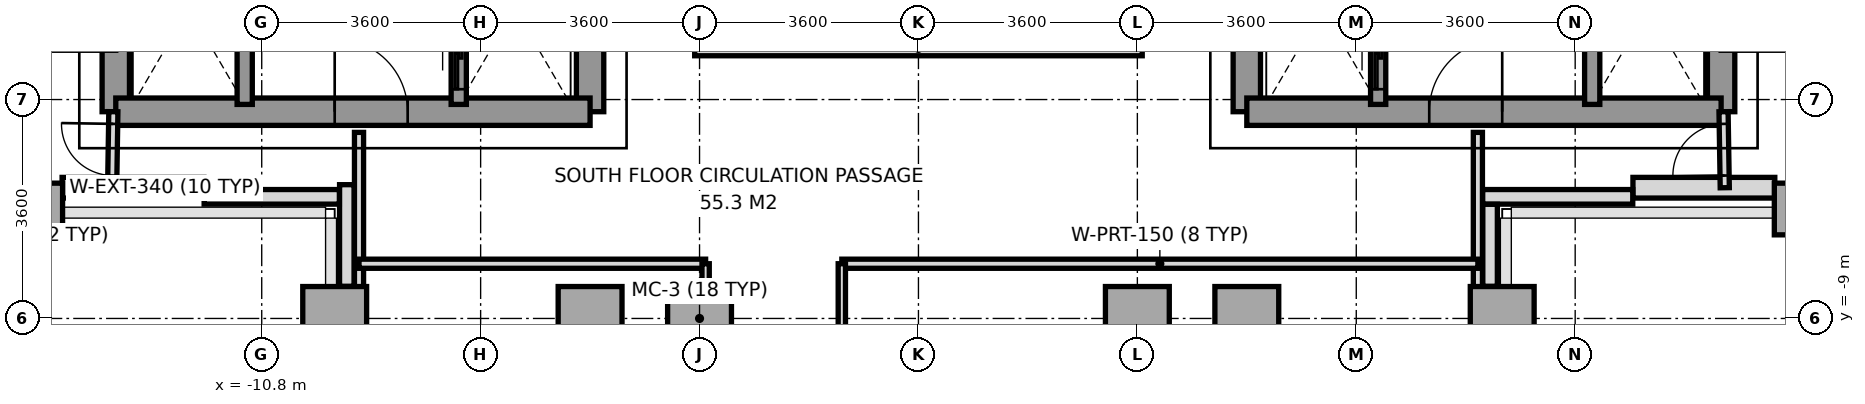
"""IFC4 building model, lengths in metres.
Left out: names, types, materials, properties, quantities, classifications, styles, units other than length and angle.
Written with IfcOpenShell. Run it as: python <this file> out.ifc"""

import sys

from ifc_helpers import new_model, si_unit, direction, frame, frame_2d, origin, origin_2d, place, context, subcontext, project, spatial, rectangle, extrude, source, transform, mapped, element, fill, save


model = new_model("IFC4")
c1 = context("Model", 3, precision=1e-05, world=origin(), true_north=direction((0.0, 1.0)))
c2 = subcontext(c1, "Body", "Model", "MODEL_VIEW")
j1 = project(units=[si_unit("LENGTHUNIT", "METRE"), si_unit("PLANEANGLEUNIT", "RADIAN")], contexts=[c1])
p1 = place(None, origin())
s1 = spatial("IfcSite", under=j1, at=p1, CompositionType="ELEMENT")
p2 = place(p1, origin())
s2 = spatial("IfcBuilding", under=s1, at=p2, CompositionType="ELEMENT")
p3 = place(p2, frame((0.0, 0.0, 97.2)))
s3 = spatial("IfcBuildingStorey", under=s2, at=p3, CompositionType="ELEMENT", Elevation=97.2)
m1 = source(origin(), c2, "Body", "SweptSolid", [
    extrude(rectangle(XDim=0.65, YDim=0.85, at=origin_2d()), origin(), (0.0, 0.0, 1.0), 3.2),
])
p4 = place(p3, frame((-14.4, -7.2, 0.0), z_axis=(0.0, 0.0, 1.0), x_axis=(1.0, 0.0, 0.0)))
e1 = element("IfcColumn", 1, at=p4, inside=s3, PredefinedType="COLUMN", context=c2, shape_type="MappedRepresentation", body=[
    mapped(m1, transform((0.0, 0.0, 0.0), x_axis=(1.0, 0.0, 0.0), y_axis=(0.0, 1.0, 0.0), z_axis=(0.0, 0.0, 1.0), scale=1.0)),
])
m2 = source(origin(), c2, "Body", "SweptSolid", [
    extrude(rectangle(XDim=1.05, YDim=1.05, at=origin_2d()), origin(), (0.0, 0.0, 1.0), 3.2),
])
for number, where, z_axis, x_axis in (
    (2, (-9.6, -9.0, 0.0), (0.0, 0.0, 1.0), (1.0, 0.0, 0.0)),
    (3, (-5.4, -9.0, 0.0), (0.0, 0.0, 1.0), (1.0, 0.0, 0.0)),
    (4, (-3.6, -9.0, 0.0), (0.0, 0.0, 1.0), (1.0, 0.0, 0.0)),
    (5, (3.6, -9.0, 0.0), (0.0, 0.0, 1.0), (1.0, 0.0, 0.0)),
    (6, (5.4, -9.0, 0.0), (0.0, 0.0, 1.0), (1.0, 0.0, 0.0)),
    (7, (9.6, -9.0, 0.0), (0.0, 0.0, 1.0), (1.0, 0.0, 0.0)),
):
    element("IfcColumn", number, at=place(p3, frame(where, z_axis=z_axis, x_axis=x_axis)), inside=s3, PredefinedType="COLUMN", context=c2, shape_type="MappedRepresentation", body=[
        mapped(m2, transform((0.0, 0.0, 0.0), x_axis=(1.0, 0.0, 0.0), y_axis=(0.0, 1.0, 0.0), z_axis=(0.0, 0.0, 1.0), scale=1.0)),
    ])
p5 = place(p3, frame((14.4, -7.2, 0.0), z_axis=(0.0, 0.0, 1.0), x_axis=(1.0, 0.0, 0.0)))
e8 = element("IfcColumn", 8, at=p5, inside=s3, PredefinedType="COLUMN", context=c2, shape_type="MappedRepresentation", body=[
    mapped(m1, transform((0.0, 0.0, 0.0), x_axis=(1.0, 0.0, 0.0), y_axis=(0.0, 1.0, 0.0), z_axis=(0.0, 0.0, 1.0), scale=1.0)),
])
for number, where, z_axis, x_axis in (
    (9, (-14.083, -6.85, 0.0), (0.0, 0.0, 1.0), (1.0, 0.0, 0.0)),
    (10, (11.75, -6.85, 0.0), (0.0, 0.0, 1.0), (1.0, 0.0, 0.0)),
):
    element("IfcWall", number, at=place(p3, frame(where, z_axis=z_axis, x_axis=x_axis)), inside=s3, PredefinedType="SOLIDWALL", context=c2, shape_type="SweptSolid", body=[
        extrude(rectangle(XDim=2.333, YDim=0.34, at=frame_2d((1.167, 0.0))), origin(), (0.0, 0.0, 1.0), 3.2),
    ])
p6 = place(p3, frame((11.747, -7.0, 0.0), z_axis=(0.0, 0.0, 1.0), x_axis=(-1.0, 0.0, 0.0)))
e11 = element("IfcWall", 11, at=p6, inside=s3, PredefinedType="PARAPET", context=c2, shape_type="SweptSolid", body=[
    extrude(rectangle(XDim=2.469, YDim=0.24, at=frame_2d((1.234, 0.0))), origin(), (0.0, 0.0, 1.0), 1.15),
])
p7 = place(p3, frame((9.4, -7.123, 0.0), z_axis=(0.0, 0.0, 1.0), x_axis=(0.0, -1.0, 0.0)))
e12 = element("IfcWall", 12, at=p7, inside=s3, PredefinedType="PARAPET", context=c2, shape_type="SweptSolid", body=[
    extrude(rectangle(XDim=1.349, YDim=0.24, at=frame_2d((0.674, 0.0))), origin(), (0.0, 0.0, 1.0), 1.15),
])
p8 = place(p3, frame((-9.4, -8.472, 0.0), z_axis=(0.0, 0.0, 1.0), x_axis=(0.0, 1.0, 0.0)))
e13 = element("IfcWall", 13, at=p8, inside=s3, PredefinedType="PARAPET", context=c2, shape_type="SweptSolid", body=[
    extrude(rectangle(XDim=1.672, YDim=0.24, at=frame_2d((0.836, 0.0))), origin(), (0.0, 0.0, 1.0), 1.15),
])
p9 = place(p3, frame((-9.523, -7.0, 0.0), z_axis=(0.0, 0.0, 1.0), x_axis=(-1.0, 0.0, 0.0)))
e14 = element("IfcWall", 14, at=p9, inside=s3, PredefinedType="PARAPET", context=c2, shape_type="SweptSolid", body=[
    extrude(rectangle(XDim=2.224, YDim=0.24, at=frame_2d((1.112, 0.0))), origin(), (0.0, 0.0, 1.0), 1.15),
])
p10 = place(p3, frame((-13.2, -5.6, 0.0), z_axis=(0.0, 0.0, 1.0), x_axis=(0.0, 1.0, 0.0)))
e15 = element("IfcWall", 15, at=p10, inside=s3, PredefinedType="SHEAR", context=c2, shape_type="SweptSolid", body=[
    extrude(rectangle(XDim=11.2, YDim=0.45, at=frame_2d((5.6, 0.0))), origin(), (0.0, 0.0, 1.0), 3.2),
])
p11 = place(p3, frame((-5.4, -5.6, 0.0), z_axis=(0.0, 0.0, 1.0), x_axis=(0.0, 1.0, 0.0)))
e16 = element("IfcWall", 16, at=p11, inside=s3, PredefinedType="SHEAR", context=c2, shape_type="SweptSolid", body=[
    extrude(rectangle(XDim=12.5, YDim=0.45, at=frame_2d((6.25, 0.0))), origin(), (0.0, 0.0, 1.0), 3.2),
])
p12 = place(p11, frame((4.55, 0.0, 0.0)))
e17 = element("IfcOpeningElement", 17, at=p12, cuts=e16, PredefinedType="OPENING", context=c2, shape_type="SweptSolid", body=[
    extrude(rectangle(XDim=1.2, YDim=2.2, at=frame_2d((0.6, 1.1))), frame((0.0, 0.235, 0.0), z_axis=(0.0, -1.0, 0.0), x_axis=(1.0, 0.0, 0.0)), (0.0, 0.0, 1.0), 0.47),
])
p13 = place(p3, frame((-13.2, -5.6, 0.0), z_axis=(0.0, 0.0, 1.0), x_axis=(1.0, 0.0, 0.0)))
e18 = element("IfcWall", 18, at=p13, inside=s3, PredefinedType="SHEAR", context=c2, shape_type="SweptSolid", body=[
    extrude(rectangle(XDim=7.8, YDim=0.45, at=frame_2d((3.9, 0.0))), origin(), (0.0, 0.0, 1.0), 3.2),
])
p14 = place(p13, frame((3.6, 0.0, 0.0)))
e19 = element("IfcOpeningElement", 19, at=p14, cuts=e18, PredefinedType="OPENING", context=c2, shape_type="SweptSolid", body=[
    extrude(rectangle(XDim=1.2, YDim=2.2, at=frame_2d((0.6, 1.1))), frame((0.0, 0.235, 0.0), z_axis=(0.0, -1.0, 0.0), x_axis=(1.0, 0.0, 0.0)), (0.0, 0.0, 1.0), 0.47),
])
p15 = place(p3, frame((13.2, -5.6, 0.0), z_axis=(0.0, 0.0, 1.0), x_axis=(0.0, 1.0, 0.0)))
e20 = element("IfcWall", 20, at=p15, inside=s3, PredefinedType="SHEAR", context=c2, shape_type="SweptSolid", body=[
    extrude(rectangle(XDim=11.2, YDim=0.45, at=frame_2d((5.6, 0.0))), origin(), (0.0, 0.0, 1.0), 3.2),
])
p16 = place(p3, frame((5.4, -5.6, 0.0), z_axis=(0.0, 0.0, 1.0), x_axis=(0.0, 1.0, 0.0)))
e21 = element("IfcWall", 21, at=p16, inside=s3, PredefinedType="SHEAR", context=c2, shape_type="SweptSolid", body=[
    extrude(rectangle(XDim=12.5, YDim=0.45, at=frame_2d((6.25, 0.0))), origin(), (0.0, 0.0, 1.0), 3.2),
])
p17 = place(p16, frame((4.55, 0.0, 0.0)))
e22 = element("IfcOpeningElement", 22, at=p17, cuts=e21, PredefinedType="OPENING", context=c2, shape_type="SweptSolid", body=[
    extrude(rectangle(XDim=1.2, YDim=2.2, at=frame_2d((0.6, 1.1))), frame((0.0, 0.235, 0.0), z_axis=(0.0, -1.0, 0.0), x_axis=(1.0, 0.0, 0.0)), (0.0, 0.0, 1.0), 0.47),
])
p18 = place(p16, frame((7.88, 0.0, 0.0)))
e23 = element("IfcOpeningElement", 23, at=p18, cuts=e21, PredefinedType="OPENING", context=c2, shape_type="SweptSolid", body=[
    extrude(rectangle(XDim=0.8, YDim=2.1, at=frame_2d((0.4, 1.05))), frame((0.0, 0.235, 0.0), z_axis=(0.0, -1.0, 0.0), x_axis=(1.0, 0.0, 0.0)), (0.0, 0.0, 1.0), 0.47),
])
p19 = place(p3, frame((5.4, -5.6, 0.0), z_axis=(0.0, 0.0, 1.0), x_axis=(1.0, 0.0, 0.0)))
e24 = element("IfcWall", 24, at=p19, inside=s3, PredefinedType="SHEAR", context=c2, shape_type="SweptSolid", body=[
    extrude(rectangle(XDim=7.8, YDim=0.45, at=frame_2d((3.9, 0.0))), origin(), (0.0, 0.0, 1.0), 3.2),
])
p20 = place(p19, frame((3.0, 0.0, 0.0)))
e25 = element("IfcOpeningElement", 25, at=p20, cuts=e24, PredefinedType="OPENING", context=c2, shape_type="SweptSolid", body=[
    extrude(rectangle(XDim=1.2, YDim=2.2, at=frame_2d((0.6, 1.1))), frame((0.0, 0.235, 0.0), z_axis=(0.0, -1.0, 0.0), x_axis=(1.0, 0.0, 0.0)), (0.0, 0.0, 1.0), 0.47),
])
for number, where, z_axis, x_axis in (
    (26, (-11.08, -5.48, 0.0), (0.0, 0.0, 1.0), (0.0, 1.0, 0.0)),
    (27, (11.08, -5.48, 0.0), (0.0, 0.0, 1.0), (0.0, 1.0, 0.0)),
):
    element("IfcWall", number, at=place(p3, frame(where, z_axis=z_axis, x_axis=x_axis)), inside=s3, PredefinedType="SOLIDWALL", context=c2, shape_type="SweptSolid", body=[
        extrude(rectangle(XDim=1.6, YDim=0.25, at=frame_2d((0.8, 0.0))), origin(), (0.0, 0.0, 1.0), 3.2),
    ])
p21 = place(p3, frame((-7.56, -5.48, 0.0), z_axis=(0.0, 0.0, 1.0), x_axis=(0.0, 1.0, 0.0)))
e28 = element("IfcWall", 28, at=p21, inside=s3, PredefinedType="SOLIDWALL", context=c2, shape_type="SweptSolid", body=[
    extrude(rectangle(XDim=1.6, YDim=0.25, at=frame_2d((0.8, 0.0))), origin(), (0.0, 0.0, 1.0), 3.2),
])
p22 = place(p21, frame((0.25, 0.0, 0.0)))
e29 = element("IfcOpeningElement", 29, at=p22, cuts=e28, PredefinedType="OPENING", context=c2, shape_type="SweptSolid", body=[
    extrude(rectangle(XDim=1.1, YDim=2.2, at=frame_2d((0.55, 1.1))), frame((0.0, 0.135, 0.0), z_axis=(0.0, -1.0, 0.0), x_axis=(1.0, 0.0, 0.0)), (0.0, 0.0, 1.0), 0.27),
])
p23 = place(p3, frame((7.56, -5.48, 0.0), z_axis=(0.0, 0.0, 1.0), x_axis=(0.0, 1.0, 0.0)))
e30 = element("IfcWall", 30, at=p23, inside=s3, PredefinedType="SOLIDWALL", context=c2, shape_type="SweptSolid", body=[
    extrude(rectangle(XDim=1.6, YDim=0.25, at=frame_2d((0.8, 0.0))), origin(), (0.0, 0.0, 1.0), 3.2),
])
p24 = place(p23, frame((0.25, 0.0, 0.0)))
e31 = element("IfcOpeningElement", 31, at=p24, cuts=e30, PredefinedType="OPENING", context=c2, shape_type="SweptSolid", body=[
    extrude(rectangle(XDim=1.1, YDim=2.2, at=frame_2d((0.55, 1.1))), frame((0.0, 0.135, 0.0), z_axis=(0.0, -1.0, 0.0), x_axis=(1.0, 0.0, 0.0)), (0.0, 0.0, 1.0), 0.27),
])
for number, where, z_axis, x_axis in (
    (32, (-9.2, -15.68, 0.0), (0.0, 0.0, 1.0), (0.0, 1.0, 0.0)),
    (33, (9.2, -15.68, 0.0), (0.0, 0.0, 1.0), (0.0, 1.0, 0.0)),
):
    element("IfcWall", number, at=place(p3, frame(where, z_axis=z_axis, x_axis=x_axis)), inside=s3, PredefinedType="PARTITIONING", context=c2, shape_type="SweptSolid", body=[
        extrude(rectangle(XDim=9.74, YDim=0.15, at=frame_2d((4.87, 0.0))), origin(), (0.0, 0.0, 1.0), 2.7),
    ])
p25 = place(p3, frame((-9.2, -8.1, 0.0), z_axis=(0.0, 0.0, 1.0), x_axis=(1.0, 0.0, 0.0)))
e34 = element("IfcWall", 34, at=p25, inside=s3, PredefinedType="PARTITIONING", context=c2, shape_type="SweptSolid", body=[
    extrude(rectangle(XDim=5.7, YDim=0.15, at=frame_2d((2.85, 0.0))), origin(), (0.0, 0.0, 1.0), 2.76),
])
p26 = place(p3, frame((-1.26, -8.1, 0.0), z_axis=(0.0, 0.0, 1.0), x_axis=(1.0, 0.0, 0.0)))
e35 = element("IfcWall", 35, at=p26, inside=s3, PredefinedType="PARTITIONING", context=c2, shape_type="SweptSolid", body=[
    extrude(rectangle(XDim=10.46, YDim=0.15, at=frame_2d((5.23, 0.0))), origin(), (0.0, 0.0, 1.0), 2.76),
])
p27 = place(p3, frame((-3.5, -20.42, 0.0), z_axis=(0.0, 0.0, 1.0), x_axis=(0.0, 1.0, 0.0)))
e36 = element("IfcWall", 36, at=p27, inside=s3, PredefinedType="PARTITIONING", context=c2, shape_type="SweptSolid", body=[
    extrude(rectangle(XDim=12.32, YDim=0.12, at=frame_2d((6.16, 0.0))), origin(), (0.0, 0.0, 1.0), 2.7),
])
p28 = place(p27, frame((2.2, 0.0, 0.0)))
e37 = element("IfcOpeningElement", 37, at=p28, cuts=e36, PredefinedType="OPENING", context=c2, shape_type="SweptSolid", body=[
    extrude(rectangle(XDim=0.95, YDim=2.15, at=frame_2d((0.475, 1.075))), frame((0.0, 0.07, 0.0), z_axis=(0.0, -1.0, 0.0), x_axis=(1.0, 0.0, 0.0)), (0.0, 0.0, 1.0), 0.14),
])
p29 = place(p3, frame((-1.26, -20.42, 0.0), z_axis=(0.0, 0.0, 1.0), x_axis=(0.0, 1.0, 0.0)))
e38 = element("IfcWall", 38, at=p29, inside=s3, PredefinedType="PARTITIONING", context=c2, shape_type="SweptSolid", body=[
    extrude(rectangle(XDim=12.32, YDim=0.12, at=frame_2d((6.16, 0.0))), origin(), (0.0, 0.0, 1.0), 2.7),
])
p30 = place(p29, frame((7.22, 0.0, 0.0)))
e39 = element("IfcOpeningElement", 39, at=p30, cuts=e38, PredefinedType="OPENING", context=c2, shape_type="SweptSolid", body=[
    extrude(rectangle(XDim=0.95, YDim=2.15, at=frame_2d((0.475, 1.075))), frame((0.0, 0.07, 0.0), z_axis=(0.0, -1.0, 0.0), x_axis=(1.0, 0.0, 0.0)), (0.0, 0.0, 1.0), 0.14),
])
p31 = place(p29, frame((1.2, 0.0, 0.0)))
e40 = element("IfcOpeningElement", 40, at=p31, cuts=e38, PredefinedType="OPENING", context=c2, shape_type="SweptSolid", body=[
    extrude(rectangle(XDim=0.95, YDim=2.15, at=frame_2d((0.475, 1.075))), frame((0.0, 0.07, 0.0), z_axis=(0.0, -1.0, 0.0), x_axis=(1.0, 0.0, 0.0)), (0.0, 0.0, 1.0), 0.14),
])
p32 = place(p3, frame((-13.26, -6.85, 0.0), z_axis=(0.0, 0.0, 1.0), x_axis=(0.016013571389, 0.999871774545, 0.0)))
e41 = element("IfcWall", 41, at=p32, inside=s3, PredefinedType="PARTITIONING", context=c2, shape_type="SweptSolid", body=[
    extrude(rectangle(XDim=1.25, YDim=0.15, at=frame_2d((0.625, 0.0))), origin(), (0.0, 0.0, 1.0), 3.2),
])
p33 = place(p32, frame((0.2, 0.0, 0.0)))
e42 = element("IfcOpeningElement", 42, at=p33, cuts=e41, PredefinedType="OPENING", context=c2, shape_type="SweptSolid", body=[
    extrude(rectangle(XDim=0.85, YDim=2.1, at=frame_2d((0.425, 1.05))), frame((0.0, 0.085, 0.0), z_axis=(0.0, -1.0, 0.0), x_axis=(1.0, 0.0, 0.0)), (0.0, 0.0, 1.0), 0.17),
])
p34 = place(p3, frame((13.26, -6.85, 0.0), z_axis=(0.0, 0.0, 1.0), x_axis=(-0.016013571389, 0.999871774545, 0.0)))
e43 = element("IfcWall", 43, at=p34, inside=s3, PredefinedType="PARTITIONING", context=c2, shape_type="SweptSolid", body=[
    extrude(rectangle(XDim=1.25, YDim=0.15, at=frame_2d((0.625, 0.0))), origin(), (0.0, 0.0, 1.0), 3.2),
])
p35 = place(p34, frame((0.2, 0.0, 0.0)))
e44 = element("IfcOpeningElement", 44, at=p35, cuts=e43, PredefinedType="OPENING", context=c2, shape_type="SweptSolid", body=[
    extrude(rectangle(XDim=0.85, YDim=2.1, at=frame_2d((0.425, 1.05))), frame((0.0, 0.085, 0.0), z_axis=(0.0, -1.0, 0.0), x_axis=(1.0, 0.0, 0.0)), (0.0, 0.0, 1.0), 0.17),
])
p36 = place(p3, frame((-3.68, -4.56, 0.0), z_axis=(0.0, 0.0, 1.0), x_axis=(1.0, 0.0, 0.0)))
e45 = element("IfcWall", 45, at=p36, inside=s3, PredefinedType="PARAPET", context=c2, shape_type="SweptSolid", body=[
    extrude(rectangle(XDim=7.36, YDim=0.24, at=frame_2d((3.68, 0.0))), origin(), (0.0, 0.0, 1.0), 1.15),
])
m3 = source(origin(), c2, "Body", "SweptSolid", [
    extrude(rectangle(XDim=1.2, YDim=2.2, at=frame_2d((0.6, 1.1))), frame((0.0, 0.025, 0.0), z_axis=(0.0, -1.0, 0.0), x_axis=(1.0, 0.0, 0.0)), (0.0, 0.0, 1.0), 0.05),
])
p37 = place(p14, origin())
e46 = element("IfcDoor", 46, at=p37, inside=s3, OperationType="SINGLE_SWING_LEFT", PredefinedType="DOOR", context=c2, shape_type="MappedRepresentation", body=[
    mapped(m3, transform((0.0, 0.0, 0.0), x_axis=(1.0, 0.0, 0.0), y_axis=(0.0, 1.0, 0.0), z_axis=(0.0, 0.0, 1.0), scale=1.0)),
])
fill(e19, e46)
p38 = place(p20, origin())
e47 = element("IfcDoor", 47, at=p38, inside=s3, OperationType="SINGLE_SWING_RIGHT", PredefinedType="DOOR", context=c2, shape_type="MappedRepresentation", body=[
    mapped(m3, transform((0.0, 0.0, 0.0), x_axis=(1.0, 0.0, 0.0), y_axis=(0.0, 1.0, 0.0), z_axis=(0.0, 0.0, 1.0), scale=1.0)),
])
fill(e25, e47)
m4 = source(origin(), c2, "Body", "SweptSolid", [
    extrude(rectangle(XDim=1.1, YDim=2.2, at=frame_2d((0.55, 1.1))), frame((0.0, 0.025, 0.0), z_axis=(0.0, -1.0, 0.0), x_axis=(1.0, 0.0, 0.0)), (0.0, 0.0, 1.0), 0.05),
])
p39 = place(p22, origin())
e48 = element("IfcDoor", 48, at=p39, inside=s3, OperationType="SLIDING_TO_LEFT", PredefinedType="DOOR", context=c2, shape_type="MappedRepresentation", body=[
    mapped(m4, transform((0.0, 0.0, 0.0), x_axis=(1.0, 0.0, 0.0), y_axis=(0.0, 1.0, 0.0), z_axis=(0.0, 0.0, 1.0), scale=1.0)),
])
fill(e29, e48)
p40 = place(p24, origin())
e49 = element("IfcDoor", 49, at=p40, inside=s3, OperationType="SLIDING_TO_LEFT", PredefinedType="DOOR", context=c2, shape_type="MappedRepresentation", body=[
    mapped(m4, transform((0.0, 0.0, 0.0), x_axis=(1.0, 0.0, 0.0), y_axis=(0.0, 1.0, 0.0), z_axis=(0.0, 0.0, 1.0), scale=1.0)),
])
fill(e31, e49)
m5 = source(origin(), c2, "Body", "SweptSolid", [
    extrude(rectangle(XDim=0.85, YDim=2.1, at=frame_2d((0.425, 1.05))), frame((0.0, 0.025, 0.0), z_axis=(0.0, -1.0, 0.0), x_axis=(1.0, 0.0, 0.0)), (0.0, 0.0, 1.0), 0.05),
])
p41 = place(p33, origin())
e50 = element("IfcDoor", 50, at=p41, inside=s3, OperationType="SINGLE_SWING_RIGHT", PredefinedType="DOOR", context=c2, shape_type="MappedRepresentation", body=[
    mapped(m5, transform((0.0, 0.0, 0.0), x_axis=(1.0, 0.0, 0.0), y_axis=(0.0, 1.0, 0.0), z_axis=(0.0, 0.0, 1.0), scale=1.0)),
])
fill(e42, e50)
p42 = place(p35, origin())
e51 = element("IfcDoor", 51, at=p42, inside=s3, OperationType="SINGLE_SWING_LEFT", PredefinedType="DOOR", context=c2, shape_type="MappedRepresentation", body=[
    mapped(m5, transform((0.0, 0.0, 0.0), x_axis=(1.0, 0.0, 0.0), y_axis=(0.0, 1.0, 0.0), z_axis=(0.0, 0.0, 1.0), scale=1.0)),
])
fill(e44, e51)
save(model, sys.argv[1])
